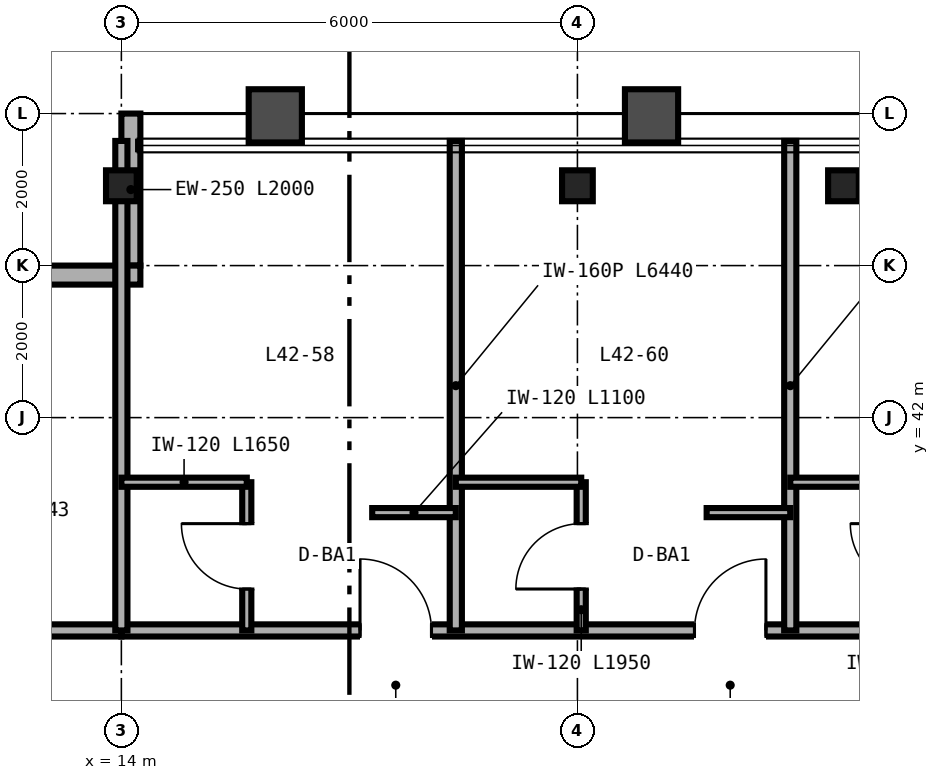
"""IFC4 building model, lengths in metres.
Left out: names, types, materials, properties, quantities, classifications, styles, units other than length and angle.
Written with IfcOpenShell. Run it as: python <this file> out.ifc"""

import sys

from ifc_helpers import new_model, si_unit, direction, frame, frame_2d, origin, origin_2d, place, context, subcontext, project, spatial, rectangle, i_section, extrude, source, transform, mapped, element, fill, save


model = new_model("IFC4")
c1 = context("Model", 3, precision=1e-05, world=origin(), true_north=direction((0.0, 1.0)))
c2 = subcontext(c1, "Body", "Model", "MODEL_VIEW")
j1 = project(units=[si_unit("LENGTHUNIT", "METRE"), si_unit("PLANEANGLEUNIT", "RADIAN")], contexts=[c1])
p1 = place(None, origin())
s1 = spatial("IfcSite", under=j1, at=p1, CompositionType="ELEMENT")
p2 = place(p1, origin())
s2 = spatial("IfcBuilding", under=s1, at=p2, CompositionType="ELEMENT")
p3 = place(p2, frame((0.0, 0.0, 170.4)))
s3 = spatial("IfcBuildingStorey", under=s2, at=p3, CompositionType="ELEMENT", Elevation=170.4)
m1 = source(origin(), c2, "Body", "SweptSolid", [
    extrude(i_section(OverallWidth=0.404, OverallDepth=0.407, WebThickness=0.027, FlangeThickness=0.044, FilletRadius=0.025, at=origin_2d()), origin(), (0.0, 0.0, 1.0), 3.37),
])
for number, where, z_axis, x_axis in (
    (1, (14.0, 45.05, 0.0), (0.0, 0.0, 1.0), (1.0, 0.0, 0.0)),
    (2, (20.0, 45.05, 0.0), (0.0, 0.0, 1.0), (1.0, 0.0, 0.0)),
    (3, (23.5, 45.05, 0.0), (0.0, 0.0, 1.0), (1.0, 0.0, 0.0)),
):
    element("IfcColumn", number, at=place(p3, frame(where, z_axis=z_axis, x_axis=x_axis)), inside=s3, PredefinedType="COLUMN", context=c2, shape_type="MappedRepresentation", body=[
        mapped(m1, transform((0.0, 0.0, 0.0), scale=1.0)),
    ])
p4 = place(p3, frame((14.125, 46.0, 0.0), z_axis=(0.0, 0.0, 1.0), x_axis=(0.0, -1.0, 0.0)))
e4 = element("IfcWall", 4, at=p4, inside=s3, PredefinedType="SOLIDWALL", context=c2, shape_type="SweptSolid", body=[
    extrude(rectangle(XDim=2.0, YDim=0.25, at=frame_2d((1.0, 0.0))), origin(), (0.0, 0.0, 1.0), 2.677),
])
p5 = place(p3, frame((14.25, 43.875, 0.0), z_axis=(0.0, 0.0, 1.0), x_axis=(-1.0, 0.0, 0.0)))
e5 = element("IfcWall", 5, at=p5, inside=s3, PredefinedType="SOLIDWALL", context=c2, shape_type="SweptSolid", body=[
    extrude(rectangle(XDim=2.0, YDim=0.25, at=frame_2d((1.0, 0.0))), origin(), (0.0, 0.0, 1.0), 3.37),
])
p6 = place(p3, frame((10.0, 39.2, 0.0), z_axis=(0.0, 0.0, 1.0), x_axis=(1.0, 0.0, 0.0)))
e6 = element("IfcWall", 6, at=p6, inside=s3, PredefinedType="PARTITIONING", context=c2, shape_type="SweptSolid", body=[
    extrude(rectangle(XDim=4.0, YDim=0.16, at=frame_2d((2.0, 0.0))), origin(), (0.0, 0.0, 1.0), 3.37),
])
p7 = place(p6, frame((1.52, 0.0, 0.0)))
e7 = element("IfcOpeningElement", 7, at=p7, cuts=e6, PredefinedType="OPENING", context=c2, shape_type="SweptSolid", body=[
    extrude(rectangle(XDim=0.96, YDim=2.15, at=frame_2d((0.48, 1.075))), frame((0.0, 0.09, 0.0), z_axis=(0.0, -1.0, 0.0), x_axis=(1.0, 0.0, 0.0)), (0.0, 0.0, 1.0), 0.18),
])
p8 = place(p3, frame((14.0, 39.2, 0.0), z_axis=(0.0, 0.0, 1.0), x_axis=(1.0, 0.0, 0.0)))
e8 = element("IfcWall", 8, at=p8, inside=s3, PredefinedType="PARTITIONING", context=c2, shape_type="SweptSolid", body=[
    extrude(rectangle(XDim=36.0, YDim=0.16, at=frame_2d((18.0, 0.0))), origin(), (0.0, 0.0, 1.0), 2.913),
])
p9 = place(p8, frame((3.14, 0.0, 0.0)))
e9 = element("IfcOpeningElement", 9, at=p9, cuts=e8, PredefinedType="OPENING", context=c2, shape_type="SweptSolid", body=[
    extrude(rectangle(XDim=0.94, YDim=2.15, at=frame_2d((0.47, 1.075))), frame((0.0, 0.09, 0.0), z_axis=(0.0, -1.0, 0.0), x_axis=(1.0, 0.0, 0.0)), (0.0, 0.0, 1.0), 0.18),
])
p10 = place(p8, frame((7.54, 0.0, 0.0)))
e10 = element("IfcOpeningElement", 10, at=p10, cuts=e8, PredefinedType="OPENING", context=c2, shape_type="SweptSolid", body=[
    extrude(rectangle(XDim=0.94, YDim=2.15, at=frame_2d((0.47, 1.075))), frame((0.0, 0.09, 0.0), z_axis=(0.0, -1.0, 0.0), x_axis=(1.0, 0.0, 0.0)), (0.0, 0.0, 1.0), 0.18),
])
p11 = place(p8, frame((11.94, 0.0, 0.0)))
e11 = element("IfcOpeningElement", 11, at=p11, cuts=e8, PredefinedType="OPENING", context=c2, shape_type="SweptSolid", body=[
    extrude(rectangle(XDim=0.94, YDim=2.15, at=frame_2d((0.47, 1.075))), frame((0.0, 0.09, 0.0), z_axis=(0.0, -1.0, 0.0), x_axis=(1.0, 0.0, 0.0)), (0.0, 0.0, 1.0), 0.18),
])
p12 = place(p8, frame((16.34, 0.0, 0.0)))
e12 = element("IfcOpeningElement", 12, at=p12, cuts=e8, PredefinedType="OPENING", context=c2, shape_type="SweptSolid", body=[
    extrude(rectangle(XDim=0.94, YDim=2.15, at=frame_2d((0.47, 1.075))), frame((0.0, 0.09, 0.0), z_axis=(0.0, -1.0, 0.0), x_axis=(1.0, 0.0, 0.0)), (0.0, 0.0, 1.0), 0.18),
])
p13 = place(p8, frame((20.94, 0.0, 0.0)))
e13 = element("IfcOpeningElement", 13, at=p13, cuts=e8, PredefinedType="OPENING", context=c2, shape_type="SweptSolid", body=[
    extrude(rectangle(XDim=0.94, YDim=2.15, at=frame_2d((0.47, 1.075))), frame((0.0, 0.09, 0.0), z_axis=(0.0, -1.0, 0.0), x_axis=(1.0, 0.0, 0.0)), (0.0, 0.0, 1.0), 0.18),
])
p14 = place(p8, frame((25.74, 0.0, 0.0)))
e14 = element("IfcOpeningElement", 14, at=p14, cuts=e8, PredefinedType="OPENING", context=c2, shape_type="SweptSolid", body=[
    extrude(rectangle(XDim=0.94, YDim=2.15, at=frame_2d((0.47, 1.075))), frame((0.0, 0.09, 0.0), z_axis=(0.0, -1.0, 0.0), x_axis=(1.0, 0.0, 0.0)), (0.0, 0.0, 1.0), 0.18),
])
p15 = place(p8, frame((30.24, 0.0, 0.0)))
e15 = element("IfcOpeningElement", 15, at=p15, cuts=e8, PredefinedType="OPENING", context=c2, shape_type="SweptSolid", body=[
    extrude(rectangle(XDim=0.94, YDim=2.15, at=frame_2d((0.47, 1.075))), frame((0.0, 0.09, 0.0), z_axis=(0.0, -1.0, 0.0), x_axis=(1.0, 0.0, 0.0)), (0.0, 0.0, 1.0), 0.18),
])
p16 = place(p8, frame((34.74, 0.0, 0.0)))
e16 = element("IfcOpeningElement", 16, at=p16, cuts=e8, PredefinedType="OPENING", context=c2, shape_type="SweptSolid", body=[
    extrude(rectangle(XDim=0.94, YDim=2.15, at=frame_2d((0.47, 1.075))), frame((0.0, 0.09, 0.0), z_axis=(0.0, -1.0, 0.0), x_axis=(1.0, 0.0, 0.0)), (0.0, 0.0, 1.0), 0.18),
])
for number, where, z_axis, x_axis in (
    (17, (14.0, 39.2, 0.0), (0.0, 0.0, 1.0), (0.0, 1.0, 0.0)),
    (18, (18.4, 39.2, 0.0), (0.0, 0.0, 1.0), (0.0, 1.0, 0.0)),
):
    element("IfcWall", number, at=place(p3, frame(where, z_axis=z_axis, x_axis=x_axis)), inside=s3, PredefinedType="PARTITIONING", context=c2, shape_type="SweptSolid", body=[
        extrude(rectangle(XDim=6.44, YDim=0.16, at=frame_2d((3.22, 0.0))), origin(), (0.0, 0.0, 1.0), 2.677),
    ])
p17 = place(p3, frame((15.65, 39.2, 0.0), z_axis=(0.0, 0.0, 1.0), x_axis=(0.0, 1.0, 0.0)))
e19 = element("IfcWall", 19, at=p17, inside=s3, PredefinedType="PARTITIONING", context=c2, shape_type="SweptSolid", body=[
    extrude(rectangle(XDim=1.95, YDim=0.12, at=frame_2d((0.975, 0.0))), origin(), (0.0, 0.0, 1.0), 3.37),
])
p18 = place(p17, frame((0.545, 0.0, 0.0)))
e20 = element("IfcOpeningElement", 20, at=p18, cuts=e19, PredefinedType="OPENING", context=c2, shape_type="SweptSolid", body=[
    extrude(rectangle(XDim=0.86, YDim=2.1, at=frame_2d((0.43, 1.05))), frame((0.0, 0.07, 0.0), z_axis=(0.0, -1.0, 0.0), x_axis=(1.0, 0.0, 0.0)), (0.0, 0.0, 1.0), 0.14),
])
p19 = place(p3, frame((14.0, 41.15, 0.0), z_axis=(0.0, 0.0, 1.0), x_axis=(1.0, 0.0, 0.0)))
e21 = element("IfcWall", 21, at=p19, inside=s3, PredefinedType="PARTITIONING", context=c2, shape_type="SweptSolid", body=[
    extrude(rectangle(XDim=1.65, YDim=0.12, at=frame_2d((0.825, 0.0))), origin(), (0.0, 0.0, 1.0), 3.37),
])
p20 = place(p3, frame((17.3, 40.75, 0.0), z_axis=(0.0, 0.0, 1.0), x_axis=(1.0, 0.0, 0.0)))
e22 = element("IfcWall", 22, at=p20, inside=s3, PredefinedType="PARTITIONING", context=c2, shape_type="SweptSolid", body=[
    extrude(rectangle(XDim=1.1, YDim=0.12, at=frame_2d((0.55, 0.0))), origin(), (0.0, 0.0, 1.0), 3.37),
])
p21 = place(p3, frame((22.8, 39.2, 0.0), z_axis=(0.0, 0.0, 1.0), x_axis=(0.0, 1.0, 0.0)))
e23 = element("IfcWall", 23, at=p21, inside=s3, PredefinedType="PARTITIONING", context=c2, shape_type="SweptSolid", body=[
    extrude(rectangle(XDim=6.44, YDim=0.16, at=frame_2d((3.22, 0.0))), origin(), (0.0, 0.0, 1.0), 2.833),
])
p22 = place(p3, frame((20.05, 39.2, 0.0), z_axis=(0.0, 0.0, 1.0), x_axis=(0.0, 1.0, 0.0)))
e24 = element("IfcWall", 24, at=p22, inside=s3, PredefinedType="PARTITIONING", context=c2, shape_type="SweptSolid", body=[
    extrude(rectangle(XDim=1.95, YDim=0.12, at=frame_2d((0.975, 0.0))), origin(), (0.0, 0.0, 1.0), 3.37),
])
p23 = place(p22, frame((0.545, 0.0, 0.0)))
e25 = element("IfcOpeningElement", 25, at=p23, cuts=e24, PredefinedType="OPENING", context=c2, shape_type="SweptSolid", body=[
    extrude(rectangle(XDim=0.86, YDim=2.1, at=frame_2d((0.43, 1.05))), frame((0.0, 0.07, 0.0), z_axis=(0.0, -1.0, 0.0), x_axis=(1.0, 0.0, 0.0)), (0.0, 0.0, 1.0), 0.14),
])
p24 = place(p3, frame((18.4, 41.15, 0.0), z_axis=(0.0, 0.0, 1.0), x_axis=(1.0, 0.0, 0.0)))
e26 = element("IfcWall", 26, at=p24, inside=s3, PredefinedType="PARTITIONING", context=c2, shape_type="SweptSolid", body=[
    extrude(rectangle(XDim=1.65, YDim=0.12, at=frame_2d((0.825, 0.0))), origin(), (0.0, 0.0, 1.0), 3.37),
])
p25 = place(p3, frame((21.7, 40.75, 0.0), z_axis=(0.0, 0.0, 1.0), x_axis=(1.0, 0.0, 0.0)))
e27 = element("IfcWall", 27, at=p25, inside=s3, PredefinedType="PARTITIONING", context=c2, shape_type="SweptSolid", body=[
    extrude(rectangle(XDim=1.1, YDim=0.12, at=frame_2d((0.55, 0.0))), origin(), (0.0, 0.0, 1.0), 3.37),
])
p26 = place(p3, frame((22.8, 41.15, 0.0), z_axis=(0.0, 0.0, 1.0), x_axis=(1.0, 0.0, 0.0)))
e28 = element("IfcWall", 28, at=p26, inside=s3, PredefinedType="PARTITIONING", context=c2, shape_type="SweptSolid", body=[
    extrude(rectangle(XDim=1.65, YDim=0.12, at=frame_2d((0.825, 0.0))), origin(), (0.0, 0.0, 1.0), 2.913),
])
m2 = source(origin(), c2, "Body", "SweptSolid", [
    extrude(rectangle(XDim=0.86, YDim=2.1, at=frame_2d((0.43, 1.05))), frame((0.0, 0.025, 0.0), z_axis=(0.0, -1.0, 0.0), x_axis=(1.0, 0.0, 0.0)), (0.0, 0.0, 1.0), 0.05),
])
p27 = place(p18, origin())
e29 = element("IfcDoor", 29, at=p27, inside=s3, OperationType="SINGLE_SWING_RIGHT", PredefinedType="DOOR", context=c2, shape_type="MappedRepresentation", body=[
    mapped(m2, transform((0.0, 0.0, 0.0), scale=1.0)),
])
fill(e20, e29)
p28 = place(p23, origin())
e30 = element("IfcDoor", 30, at=p28, inside=s3, OperationType="SINGLE_SWING_LEFT", PredefinedType="DOOR", context=c2, shape_type="MappedRepresentation", body=[
    mapped(m2, transform((0.0, 0.0, 0.0), scale=1.0)),
])
fill(e25, e30)
m3 = source(origin(), c2, "Body", "SweptSolid", [
    extrude(rectangle(XDim=0.94, YDim=2.15, at=frame_2d((0.47, 1.075))), frame((0.0, 0.025, 0.0), z_axis=(0.0, -1.0, 0.0), x_axis=(1.0, 0.0, 0.0)), (0.0, 0.0, 1.0), 0.05),
])
p29 = place(p9, origin())
e31 = element("IfcDoor", 31, at=p29, inside=s3, OperationType="SINGLE_SWING_LEFT", PredefinedType="DOOR", context=c2, shape_type="MappedRepresentation", body=[
    mapped(m3, transform((0.0, 0.0, 0.0), scale=1.0)),
])
fill(e9, e31)
p30 = place(p10, origin())
e32 = element("IfcDoor", 32, at=p30, inside=s3, OperationType="SINGLE_SWING_RIGHT", PredefinedType="DOOR", context=c2, shape_type="MappedRepresentation", body=[
    mapped(m3, transform((0.0, 0.0, 0.0), scale=1.0)),
])
fill(e10, e32)
save(model, sys.argv[1])
